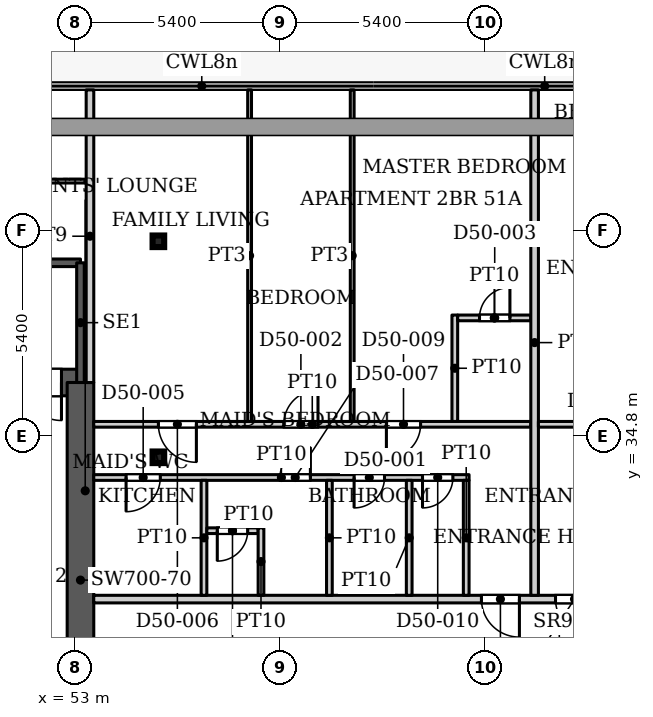
"""IFC4 building model, lengths in metres.
Left out: names, types, materials, properties, quantities, classifications, styles, units other than length and angle.
Written with IfcOpenShell. Run it as: python <this file> out.ifc"""

import sys

from ifc_helpers import new_model, si_unit, direction, frame, frame_2d, origin, origin_2d, place, context, subcontext, project, spatial, rectangle, hollow_rectangle, extrude, source, transform, mapped, element, fill, save


model = new_model("IFC4")
c1 = context("Model", 3, precision=1e-05, world=origin(), true_north=direction((0.0, 1.0)))
c2 = subcontext(c1, "Body", "Model", "MODEL_VIEW")
j1 = project(units=[si_unit("LENGTHUNIT", "METRE"), si_unit("PLANEANGLEUNIT", "RADIAN")], contexts=[c1])
p1 = place(None, origin())
s1 = spatial("IfcSite", under=j1, at=p1, CompositionType="ELEMENT")
p2 = place(p1, origin())
s2 = spatial("IfcBuilding", under=s1, at=p2, CompositionType="ELEMENT")
p3 = place(p2, frame((0.0, 0.0, 220.1)))
s3 = spatial("IfcBuildingStorey", under=s2, at=p3, CompositionType="ELEMENT", Elevation=220.1)
for number, where, z_axis, x_axis in (
    (1, (55.2, 34.232, 0.0), (0.0, 0.0, 1.0), (1.0, 0.0, 0.0)),
    (2, (55.2, 39.916, 0.0), (0.0, 0.0, 1.0), (1.0, 0.0, 0.0)),
):
    element("IfcColumn", number, at=place(p3, frame(where, z_axis=z_axis, x_axis=x_axis)), inside=s3, PredefinedType="COLUMN", context=c2, shape_type="SweptSolid", body=[
        extrude(hollow_rectangle(XDim=0.305, YDim=0.305, WallThickness=0.016, InnerFilletRadius=0.016, OuterFilletRadius=0.032, at=origin_2d()), origin(), (0.0, 0.0, 1.0), 3.9),
    ])
p4 = place(p3, frame((34.75, 36.2, 0.0), z_axis=(0.0, 0.0, 1.0), x_axis=(1.0, 0.0, 0.0)))
e3 = element("IfcWall", 3, at=p4, inside=s3, PredefinedType="SHEAR", context=c2, shape_type="SweptSolid", body=[
    extrude(rectangle(XDim=18.4, YDim=0.7, at=frame_2d((9.2, 0.0))), origin(), (0.0, 0.0, 1.0), 3.9),
])
p5 = place(p4, frame((16.9, 0.0, 0.0)))
e4 = element("IfcOpeningElement", 4, at=p5, cuts=e3, PredefinedType="OPENING", context=c2, shape_type="SweptSolid", body=[
    extrude(rectangle(XDim=1.0, YDim=2.2, at=frame_2d((0.5, 1.1))), frame((0.0, 0.36, 0.0), z_axis=(0.0, -1.0, 0.0), x_axis=(1.0, 0.0, 0.0)), (0.0, 0.0, 1.0), 0.72),
])
p6 = place(p3, frame((53.15, 25.8, 0.0), z_axis=(0.0, 0.0, 1.0), x_axis=(0.0, 1.0, 0.0)))
e5 = element("IfcWall", 5, at=p6, inside=s3, PredefinedType="SHEAR", context=c2, shape_type="SweptSolid", body=[
    extrude(rectangle(XDim=10.4, YDim=0.7, at=frame_2d((5.2, 0.0))), origin(), (0.0, 0.0, 1.0), 3.9),
])
p7 = place(p3, frame((43.99, 39.35, 0.0), z_axis=(0.0, 0.0, 1.0), x_axis=(1.0, 0.0, 0.0)))
e6 = element("IfcWall", 6, at=p7, inside=s3, PredefinedType="SHEAR", context=c2, shape_type="SweptSolid", body=[
    extrude(rectangle(XDim=9.16, YDim=0.2, at=frame_2d((4.58, 0.0))), origin(), (0.0, 0.0, 1.0), 3.9),
])
p8 = place(p3, frame((53.15, 36.2, 0.0), z_axis=(0.0, 0.0, 1.0), x_axis=(0.0, 1.0, 0.0)))
e7 = element("IfcWall", 7, at=p8, inside=s3, PredefinedType="SHEAR", context=c2, shape_type="SweptSolid", body=[
    extrude(rectangle(XDim=3.15, YDim=0.2, at=frame_2d((1.575, 0.0))), origin(), (0.0, 0.0, 1.0), 3.9),
])
p9 = place(p3, frame((38.349, 41.5, 0.0), z_axis=(0.0, 0.0, 1.0), x_axis=(1.0, 0.0, 0.0)))
e8 = element("IfcWall", 8, at=p9, inside=s3, PredefinedType="PARTITIONING", context=c2, shape_type="SweptSolid", body=[
    extrude(rectangle(XDim=14.951, YDim=0.1, at=frame_2d((7.476, 0.0))), origin(), (0.0, 0.0, 1.0), 3.6),
])
p10 = place(p9, frame((6.851, 0.0, 0.0)))
e9 = element("IfcOpeningElement", 9, at=p10, cuts=e8, PredefinedType="OPENING", context=c2, shape_type="SweptSolid", body=[
    extrude(rectangle(XDim=1.0, YDim=2.1, at=frame_2d((0.5, 1.05))), frame((0.0, 0.06, 0.0), z_axis=(0.0, -1.0, 0.0), x_axis=(1.0, 0.0, 0.0)), (0.0, 0.0, 1.0), 0.12),
])
p11 = place(p3, frame((53.4, 36.199, 0.0), z_axis=(0.0, 0.0, 1.0), x_axis=(0.0, 1.0, 0.0)))
e10 = element("IfcWall", 10, at=p11, inside=s3, PredefinedType="PARTITIONING", context=c2, shape_type="SweptSolid", body=[
    extrude(rectangle(XDim=7.701, YDim=0.2, at=frame_2d((3.851, 0.0))), origin(), (0.0, 0.0, 1.0), 3.6),
])
p12 = place(p3, frame((53.499, 30.5, 0.0), z_axis=(0.0, 0.0, 1.0), x_axis=(1.0, 0.0, 0.0)))
e11 = element("IfcWall", 11, at=p12, inside=s3, PredefinedType="PARTITIONING", context=c2, shape_type="SweptSolid", body=[
    extrude(rectangle(XDim=28.401, YDim=0.2, at=frame_2d((14.2, 0.0))), origin(), (0.0, 0.0, 1.0), 3.6),
])
p13 = place(p12, frame((10.201, 0.0, 0.0)))
e12 = element("IfcOpeningElement", 12, at=p13, cuts=e11, PredefinedType="OPENING", context=c2, shape_type="SweptSolid", body=[
    extrude(rectangle(XDim=1.0, YDim=2.1, at=frame_2d((0.5, 1.05))), frame((0.0, 0.11, 0.0), z_axis=(0.0, -1.0, 0.0), x_axis=(1.0, 0.0, 0.0)), (0.0, 0.0, 1.0), 0.22),
])
p14 = place(p12, frame((12.151, 0.0, 0.0)))
e13 = element("IfcOpeningElement", 13, at=p14, cuts=e11, PredefinedType="OPENING", context=c2, shape_type="SweptSolid", body=[
    extrude(rectangle(XDim=1.0, YDim=2.1, at=frame_2d((0.5, 1.05))), frame((0.0, 0.11, 0.0), z_axis=(0.0, -1.0, 0.0), x_axis=(1.0, 0.0, 0.0)), (0.0, 0.0, 1.0), 0.22),
])
p15 = place(p12, frame((24.001, 0.0, 0.0)))
e14 = element("IfcOpeningElement", 14, at=p15, cuts=e11, PredefinedType="OPENING", context=c2, shape_type="SweptSolid", body=[
    extrude(rectangle(XDim=1.0, YDim=2.1, at=frame_2d((0.5, 1.05))), frame((0.0, 0.11, 0.0), z_axis=(0.0, -1.0, 0.0), x_axis=(1.0, 0.0, 0.0)), (0.0, 0.0, 1.0), 0.22),
])
p16 = place(p3, frame((53.499, 33.7, 0.0), z_axis=(0.0, 0.0, 1.0), x_axis=(1.0, 0.0, 0.0)))
e15 = element("IfcWall", 15, at=p16, inside=s3, PredefinedType="PARTITIONING", context=c2, shape_type="SweptSolid", body=[
    extrude(rectangle(XDim=9.876, YDim=0.15, at=frame_2d((4.938, 0.0))), origin(), (0.0, 0.0, 1.0), 3.6),
])
p17 = place(p16, frame((6.851, 0.0, 0.0)))
e16 = element("IfcOpeningElement", 16, at=p17, cuts=e15, PredefinedType="OPENING", context=c2, shape_type="SweptSolid", body=[
    extrude(rectangle(XDim=0.8, YDim=2.1, at=frame_2d((0.4, 1.05))), frame((0.0, 0.085, 0.0), z_axis=(0.0, -1.0, 0.0), x_axis=(1.0, 0.0, 0.0)), (0.0, 0.0, 1.0), 0.17),
])
p18 = place(p16, frame((0.851, 0.0, 0.0)))
e17 = element("IfcOpeningElement", 17, at=p18, cuts=e15, PredefinedType="OPENING", context=c2, shape_type="SweptSolid", body=[
    extrude(rectangle(XDim=0.9, YDim=2.1, at=frame_2d((0.45, 1.05))), frame((0.0, 0.085, 0.0), z_axis=(0.0, -1.0, 0.0), x_axis=(1.0, 0.0, 0.0)), (0.0, 0.0, 1.0), 0.17),
])
p19 = place(p16, frame((4.901, 0.0, 0.0)))
e18 = element("IfcOpeningElement", 18, at=p19, cuts=e15, PredefinedType="OPENING", context=c2, shape_type="SweptSolid", body=[
    extrude(rectangle(XDim=0.8, YDim=2.1, at=frame_2d((0.4, 1.05))), frame((0.0, 0.085, 0.0), z_axis=(0.0, -1.0, 0.0), x_axis=(1.0, 0.0, 0.0)), (0.0, 0.0, 1.0), 0.17),
])
p20 = place(p16, frame((8.651, 0.0, 0.0)))
e19 = element("IfcOpeningElement", 19, at=p20, cuts=e15, PredefinedType="OPENING", context=c2, shape_type="SweptSolid", body=[
    extrude(rectangle(XDim=0.8, YDim=2.1, at=frame_2d((0.4, 1.05))), frame((0.0, 0.085, 0.0), z_axis=(0.0, -1.0, 0.0), x_axis=(1.0, 0.0, 0.0)), (0.0, 0.0, 1.0), 0.17),
])
p21 = place(p3, frame((53.499, 35.1, 0.0), z_axis=(0.0, 0.0, 1.0), x_axis=(1.0, 0.0, 0.0)))
e20 = element("IfcWall", 20, at=p21, inside=s3, PredefinedType="PARTITIONING", context=c2, shape_type="SweptSolid", body=[
    extrude(rectangle(XDim=11.501, YDim=0.15, at=frame_2d((5.75, 0.0))), origin(), (0.0, 0.0, 1.0), 3.6),
])
p22 = place(p21, frame((5.001, 0.0, 0.0)))
e21 = element("IfcOpeningElement", 21, at=p22, cuts=e20, PredefinedType="OPENING", context=c2, shape_type="SweptSolid", body=[
    extrude(rectangle(XDim=0.9, YDim=2.1, at=frame_2d((0.45, 1.05))), frame((0.0, 0.085, 0.0), z_axis=(0.0, -1.0, 0.0), x_axis=(1.0, 0.0, 0.0)), (0.0, 0.0, 1.0), 0.17),
])
p23 = place(p21, frame((1.701, 0.0, 0.0)))
e22 = element("IfcOpeningElement", 22, at=p23, cuts=e20, PredefinedType="OPENING", context=c2, shape_type="SweptSolid", body=[
    extrude(rectangle(XDim=1.0, YDim=2.1, at=frame_2d((0.5, 1.05))), frame((0.0, 0.085, 0.0), z_axis=(0.0, -1.0, 0.0), x_axis=(1.0, 0.0, 0.0)), (0.0, 0.0, 1.0), 0.17),
])
p24 = place(p21, frame((7.701, 0.0, 0.0)))
e23 = element("IfcOpeningElement", 23, at=p24, cuts=e20, PredefinedType="OPENING", context=c2, shape_type="SweptSolid", body=[
    extrude(rectangle(XDim=0.9, YDim=2.1, at=frame_2d((0.45, 1.05))), frame((0.0, 0.085, 0.0), z_axis=(0.0, -1.0, 0.0), x_axis=(1.0, 0.0, 0.0)), (0.0, 0.0, 1.0), 0.17),
])
p25 = place(p3, frame((56.4, 30.6, 0.0), z_axis=(0.0, 0.0, 1.0), x_axis=(0.0, 1.0, 0.0)))
e24 = element("IfcWall", 24, at=p25, inside=s3, PredefinedType="PARTITIONING", context=c2, shape_type="SweptSolid", body=[
    extrude(rectangle(XDim=3.025, YDim=0.15, at=frame_2d((1.512, 0.0))), origin(), (0.0, 0.0, 1.0), 3.6),
])
p26 = place(p3, frame((56.475, 32.3, 0.0), z_axis=(0.0, 0.0, 1.0), x_axis=(1.0, 0.0, 0.0)))
e25 = element("IfcWall", 25, at=p26, inside=s3, PredefinedType="PARTITIONING", context=c2, shape_type="SweptSolid", body=[
    extrude(rectangle(XDim=1.35, YDim=0.15, at=frame_2d((0.675, 0.0))), origin(), (0.0, 0.0, 1.0), 3.6),
])
p27 = place(p26, frame((0.275, 0.0, 0.0)))
e26 = element("IfcOpeningElement", 26, at=p27, cuts=e25, PredefinedType="OPENING", context=c2, shape_type="SweptSolid", body=[
    extrude(rectangle(XDim=0.8, YDim=2.1, at=frame_2d((0.4, 1.05))), frame((0.0, 0.085, 0.0), z_axis=(0.0, -1.0, 0.0), x_axis=(1.0, 0.0, 0.0)), (0.0, 0.0, 1.0), 0.17),
])
p28 = place(p3, frame((57.6, 35.175, 0.0), z_axis=(0.0, 0.0, 1.0), x_axis=(0.0, 1.0, 0.0)))
e27 = element("IfcWall", 27, at=p28, inside=s3, PredefinedType="PARTITIONING", context=c2, shape_type="SweptSolid", body=[
    extrude(rectangle(XDim=8.725, YDim=0.1, at=frame_2d((4.362, 0.0))), origin(), (0.0, 0.0, 1.0), 3.6),
])
p29 = place(p3, frame((57.9, 30.6, 0.0), z_axis=(0.0, 0.0, 1.0), x_axis=(0.0, 1.0, 0.0)))
e28 = element("IfcWall", 28, at=p29, inside=s3, PredefinedType="PARTITIONING", context=c2, shape_type="SweptSolid", body=[
    extrude(rectangle(XDim=1.775, YDim=0.15, at=frame_2d((0.887, 0.0))), origin(), (0.0, 0.0, 1.0), 3.6),
])
p30 = place(p3, frame((59.7, 30.6, 0.0), z_axis=(0.0, 0.0, 1.0), x_axis=(0.0, 1.0, 0.0)))
e29 = element("IfcWall", 29, at=p30, inside=s3, PredefinedType="PARTITIONING", context=c2, shape_type="SweptSolid", body=[
    extrude(rectangle(XDim=3.025, YDim=0.15, at=frame_2d((1.512, 0.0))), origin(), (0.0, 0.0, 1.0), 3.6),
])
p31 = place(p3, frame((60.3, 35.175, 0.0), z_axis=(0.0, 0.0, 1.0), x_axis=(0.0, 1.0, 0.0)))
e30 = element("IfcWall", 30, at=p31, inside=s3, PredefinedType="PARTITIONING", context=c2, shape_type="SweptSolid", body=[
    extrude(rectangle(XDim=8.725, YDim=0.1, at=frame_2d((4.362, 0.0))), origin(), (0.0, 0.0, 1.0), 3.6),
])
p32 = place(p3, frame((61.8, 30.6, 0.0), z_axis=(0.0, 0.0, 1.0), x_axis=(0.0, 1.0, 0.0)))
e31 = element("IfcWall", 31, at=p32, inside=s3, PredefinedType="PARTITIONING", context=c2, shape_type="SweptSolid", body=[
    extrude(rectangle(XDim=3.025, YDim=0.15, at=frame_2d((1.512, 0.0))), origin(), (0.0, 0.0, 1.0), 3.6),
])
p33 = place(p3, frame((63.0, 35.175, 0.0), z_axis=(0.0, 0.0, 1.0), x_axis=(0.0, 1.0, 0.0)))
e32 = element("IfcWall", 32, at=p33, inside=s3, PredefinedType="PARTITIONING", context=c2, shape_type="SweptSolid", body=[
    extrude(rectangle(XDim=2.8, YDim=0.15, at=frame_2d((1.4, 0.0))), origin(), (0.0, 0.0, 1.0), 3.6),
])
p34 = place(p3, frame((63.075, 37.9, 0.0), z_axis=(0.0, 0.0, 1.0), x_axis=(1.0, 0.0, 0.0)))
e33 = element("IfcWall", 33, at=p34, inside=s3, PredefinedType="PARTITIONING", context=c2, shape_type="SweptSolid", body=[
    extrude(rectangle(XDim=1.925, YDim=0.15, at=frame_2d((0.962, 0.0))), origin(), (0.0, 0.0, 1.0), 3.6),
])
p35 = place(p34, frame((0.575, 0.0, 0.0)))
e34 = element("IfcOpeningElement", 34, at=p35, cuts=e33, PredefinedType="OPENING", context=c2, shape_type="SweptSolid", body=[
    extrude(rectangle(XDim=0.8, YDim=2.1, at=frame_2d((0.4, 1.05))), frame((0.0, 0.085, 0.0), z_axis=(0.0, -1.0, 0.0), x_axis=(1.0, 0.0, 0.0)), (0.0, 0.0, 1.0), 0.17),
])
p36 = place(p3, frame((63.3, 30.6, 0.0), z_axis=(0.0, 0.0, 1.0), x_axis=(0.0, 1.0, 0.0)))
e35 = element("IfcWall", 35, at=p36, inside=s3, PredefinedType="PARTITIONING", context=c2, shape_type="SweptSolid", body=[
    extrude(rectangle(XDim=3.025, YDim=0.15, at=frame_2d((1.512, 0.0))), origin(), (0.0, 0.0, 1.0), 3.6),
])
p37 = place(p3, frame((65.1, 30.6, 0.0), z_axis=(0.0, 0.0, 1.0), x_axis=(0.0, 1.0, 0.0)))
e36 = element("IfcWall", 36, at=p37, inside=s3, PredefinedType="PARTITIONING", context=c2, shape_type="SweptSolid", body=[
    extrude(rectangle(XDim=13.3, YDim=0.2, at=frame_2d((6.65, 0.0))), origin(), (0.0, 0.0, 1.0), 3.6),
])
p38 = place(p3, frame((65.2, 35.1, 0.0), z_axis=(0.0, 0.0, 1.0), x_axis=(1.0, 0.0, 0.0)))
e37 = element("IfcWall", 37, at=p38, inside=s3, PredefinedType="PARTITIONING", context=c2, shape_type="SweptSolid", body=[
    extrude(rectangle(XDim=9.4, YDim=0.15, at=frame_2d((4.7, 0.0))), origin(), (0.0, 0.0, 1.0), 3.6),
])
p39 = place(p38, frame((1.4, 0.0, 0.0)))
e38 = element("IfcOpeningElement", 38, at=p39, cuts=e37, PredefinedType="OPENING", context=c2, shape_type="SweptSolid", body=[
    extrude(rectangle(XDim=0.9, YDim=2.1, at=frame_2d((0.45, 1.05))), frame((0.0, 0.085, 0.0), z_axis=(0.0, -1.0, 0.0), x_axis=(1.0, 0.0, 0.0)), (0.0, 0.0, 1.0), 0.17),
])
p40 = place(p38, frame((6.15, 0.0, 0.0)))
e39 = element("IfcOpeningElement", 39, at=p40, cuts=e37, PredefinedType="OPENING", context=c2, shape_type="SweptSolid", body=[
    extrude(rectangle(XDim=1.0, YDim=2.1, at=frame_2d((0.5, 1.05))), frame((0.0, 0.085, 0.0), z_axis=(0.0, -1.0, 0.0), x_axis=(1.0, 0.0, 0.0)), (0.0, 0.0, 1.0), 0.17),
])
m1 = source(origin(), c2, "Body", "SweptSolid", [
    extrude(rectangle(XDim=1.0, YDim=2.2, at=frame_2d((0.5, 1.1))), frame((0.0, 0.025, 0.0), z_axis=(0.0, -1.0, 0.0), x_axis=(1.0, 0.0, 0.0)), (0.0, 0.0, 1.0), 0.05),
])
p41 = place(p5, origin())
e40 = element("IfcDoor", 40, at=p41, inside=s3, OperationType="SINGLE_SWING_RIGHT", PredefinedType="DOOR", context=c2, shape_type="MappedRepresentation", body=[
    mapped(m1, transform((0.0, 0.0, 0.0), x_axis=(1.0, 0.0, 0.0), y_axis=(0.0, 1.0, 0.0), z_axis=(0.0, 0.0, 1.0), scale=1.0)),
])
fill(e4, e40)
m2 = source(origin(), c2, "Body", "SweptSolid", [
    extrude(rectangle(XDim=0.8, YDim=2.1, at=frame_2d((0.4, 1.05))), frame((0.0, 0.025, 0.0), z_axis=(0.0, -1.0, 0.0), x_axis=(1.0, 0.0, 0.0)), (0.0, 0.0, 1.0), 0.05),
])
p42 = place(p17, origin())
e41 = element("IfcDoor", 41, at=p42, inside=s3, OperationType="SINGLE_SWING_RIGHT", PredefinedType="DOOR", context=c2, shape_type="MappedRepresentation", body=[
    mapped(m2, transform((0.0, 0.0, 0.0), x_axis=(1.0, 0.0, 0.0), y_axis=(0.0, 1.0, 0.0), z_axis=(0.0, 0.0, 1.0), scale=1.0)),
])
fill(e16, e41)
m3 = source(origin(), c2, "Body", "SweptSolid", [
    extrude(rectangle(XDim=0.9, YDim=2.1, at=frame_2d((0.45, 1.05))), frame((0.0, 0.025, 0.0), z_axis=(0.0, -1.0, 0.0), x_axis=(1.0, 0.0, 0.0)), (0.0, 0.0, 1.0), 0.05),
])
p43 = place(p22, origin())
e42 = element("IfcDoor", 42, at=p43, inside=s3, OperationType="SINGLE_SWING_LEFT", PredefinedType="DOOR", context=c2, shape_type="MappedRepresentation", body=[
    mapped(m3, transform((0.0, 0.0, 0.0), x_axis=(1.0, 0.0, 0.0), y_axis=(0.0, 1.0, 0.0), z_axis=(0.0, 0.0, 1.0), scale=1.0)),
])
fill(e21, e42)
p44 = place(p35, origin())
e43 = element("IfcDoor", 43, at=p44, inside=s3, OperationType="SINGLE_SWING_LEFT", PredefinedType="DOOR", context=c2, shape_type="MappedRepresentation", body=[
    mapped(m2, transform((0.0, 0.0, 0.0), x_axis=(1.0, 0.0, 0.0), y_axis=(0.0, 1.0, 0.0), z_axis=(0.0, 0.0, 1.0), scale=1.0)),
])
fill(e34, e43)
m4 = source(origin(), c2, "Body", "SweptSolid", [
    extrude(rectangle(XDim=1.0, YDim=2.1, at=frame_2d((0.5, 1.05))), frame((0.0, 0.025, 0.0), z_axis=(0.0, -1.0, 0.0), x_axis=(1.0, 0.0, 0.0)), (0.0, 0.0, 1.0), 0.05),
])
p45 = place(p13, origin())
e44 = element("IfcDoor", 44, at=p45, inside=s3, OperationType="SINGLE_SWING_RIGHT", PredefinedType="DOOR", context=c2, shape_type="MappedRepresentation", body=[
    mapped(m4, transform((0.0, 0.0, 0.0), x_axis=(1.0, 0.0, 0.0), y_axis=(0.0, 1.0, 0.0), z_axis=(0.0, 0.0, 1.0), scale=1.0)),
])
fill(e12, e44)
p46 = place(p18, origin())
e45 = element("IfcDoor", 45, at=p46, inside=s3, OperationType="SINGLE_SWING_RIGHT", PredefinedType="DOOR", context=c2, shape_type="MappedRepresentation", body=[
    mapped(m3, transform((0.0, 0.0, 0.0), x_axis=(1.0, 0.0, 0.0), y_axis=(0.0, 1.0, 0.0), z_axis=(0.0, 0.0, 1.0), scale=1.0)),
])
fill(e17, e45)
m5 = source(origin(), c2, "Body", "SweptSolid", [
    extrude(rectangle(XDim=1.0, YDim=2.1, at=frame_2d((0.5, 1.05))), frame((0.0, 0.025, 0.0), z_axis=(0.0, -1.0, 0.0), x_axis=(1.0, 0.0, 0.0)), (0.0, 0.0, 1.0), 0.05),
])
p47 = place(p23, origin())
e46 = element("IfcDoor", 46, at=p47, inside=s3, OperationType="SINGLE_SWING_RIGHT", PredefinedType="DOOR", context=c2, shape_type="MappedRepresentation", body=[
    mapped(m5, transform((0.0, 0.0, 0.0), x_axis=(1.0, 0.0, 0.0), y_axis=(0.0, 1.0, 0.0), z_axis=(0.0, 0.0, 1.0), scale=1.0)),
])
fill(e22, e46)
p48 = place(p19, origin())
e47 = element("IfcDoor", 47, at=p48, inside=s3, OperationType="SINGLE_SWING_LEFT", PredefinedType="DOOR", context=c2, shape_type="MappedRepresentation", body=[
    mapped(m2, transform((0.0, 0.0, 0.0), x_axis=(1.0, 0.0, 0.0), y_axis=(0.0, 1.0, 0.0), z_axis=(0.0, 0.0, 1.0), scale=1.0)),
])
fill(e18, e47)
p49 = place(p27, origin())
e48 = element("IfcDoor", 48, at=p49, inside=s3, OperationType="SINGLE_SWING_RIGHT", PredefinedType="DOOR", context=c2, shape_type="MappedRepresentation", body=[
    mapped(m2, transform((0.0, 0.0, 0.0), x_axis=(1.0, 0.0, 0.0), y_axis=(0.0, 1.0, 0.0), z_axis=(0.0, 0.0, 1.0), scale=1.0)),
])
fill(e26, e48)
p50 = place(p24, origin())
e49 = element("IfcDoor", 49, at=p50, inside=s3, OperationType="SINGLE_SWING_RIGHT", PredefinedType="DOOR", context=c2, shape_type="MappedRepresentation", body=[
    mapped(m3, transform((0.0, 0.0, 0.0), x_axis=(1.0, 0.0, 0.0), y_axis=(0.0, 1.0, 0.0), z_axis=(0.0, 0.0, 1.0), scale=1.0)),
])
fill(e23, e49)
p51 = place(p20, origin())
e50 = element("IfcDoor", 50, at=p51, inside=s3, OperationType="SINGLE_SWING_RIGHT", PredefinedType="DOOR", context=c2, shape_type="MappedRepresentation", body=[
    mapped(m2, transform((0.0, 0.0, 0.0), x_axis=(1.0, 0.0, 0.0), y_axis=(0.0, 1.0, 0.0), z_axis=(0.0, 0.0, 1.0), scale=1.0)),
])
fill(e19, e50)
p52 = place(p14, origin())
e51 = element("IfcDoor", 51, at=p52, inside=s3, OperationType="SINGLE_SWING_RIGHT", PredefinedType="DOOR", context=c2, shape_type="MappedRepresentation", body=[
    mapped(m4, transform((0.0, 0.0, 0.0), x_axis=(1.0, 0.0, 0.0), y_axis=(0.0, 1.0, 0.0), z_axis=(0.0, 0.0, 1.0), scale=1.0)),
])
fill(e13, e51)
save(model, sys.argv[1])
